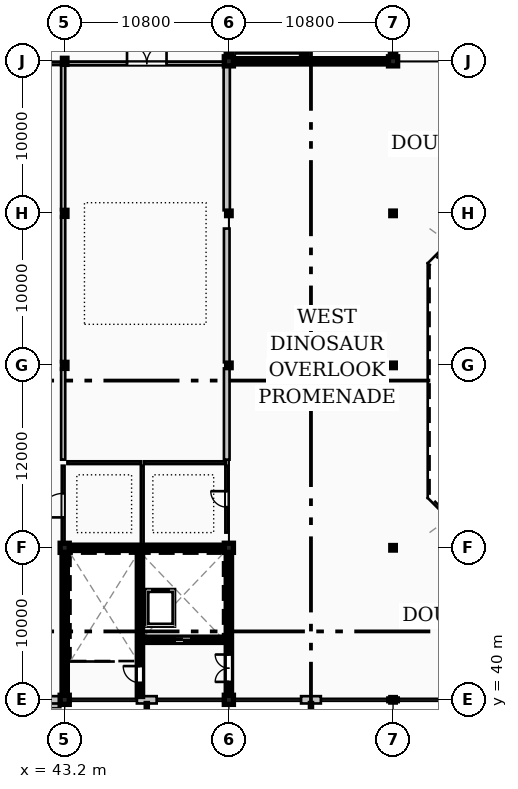
"""IFC4 building model, lengths in metres.
Left out: names, types, materials, properties, quantities, classifications, styles, units other than length and angle.
Written with IfcOpenShell. Run it as: python <this file> out.ifc"""

import sys

from ifc_helpers import new_model, si_unit, direction, frame, frame_2d, origin, origin_2d, place, context, subcontext, project, spatial, rectangle, hollow_rectangle, i_section, extrude, element, fill, save


model = new_model("IFC4")
c1 = context("Model", 3, precision=1e-05, world=origin(), true_north=direction((0.0, 1.0)))
c2 = subcontext(c1, "Body", "Model", "MODEL_VIEW")
j1 = project(units=[si_unit("LENGTHUNIT", "METRE"), si_unit("PLANEANGLEUNIT", "RADIAN")], contexts=[c1])
p1 = place(None, origin())
s1 = spatial("IfcSite", under=j1, at=p1, CompositionType="ELEMENT")
p2 = place(p1, origin())
s2 = spatial("IfcBuilding", under=s1, at=p2, CompositionType="ELEMENT")
p3 = place(p2, frame((0.0, 0.0, 14.4)))
s3 = spatial("IfcBuildingStorey", under=s2, at=p3, CompositionType="ELEMENT", Elevation=14.4)
for number, where, z_axis, x_axis in (
    (1, (43.2, 40.0, 0.0), (0.0, 0.0, 1.0), (1.0, 0.0, 0.0)),
    (2, (43.2, 50.0, 0.0), (0.0, 0.0, 1.0), (1.0, 0.0, 0.0)),
):
    element("IfcColumn", number, at=place(p3, frame(where, z_axis=z_axis, x_axis=x_axis)), inside=s3, PredefinedType="COLUMN", context=c2, shape_type="SweptSolid", body=[
        extrude(rectangle(XDim=0.6, YDim=0.6, at=origin_2d()), origin(), (0.0, 0.0, 1.0), 9.6),
    ])
for number, where, z_axis, x_axis in (
    (3, (43.2, 62.0, 0.0), (0.0, 0.0, 1.0), (1.0, 0.0, 0.0)),
    (4, (43.2, 72.0, 0.0), (0.0, 0.0, 1.0), (1.0, 0.0, 0.0)),
    (5, (43.2, 82.0, 0.0), (0.0, 0.0, 1.0), (1.0, 0.0, 0.0)),
):
    element("IfcColumn", number, at=place(p3, frame(where, z_axis=z_axis, x_axis=x_axis)), inside=s3, PredefinedType="COLUMN", context=c2, shape_type="SweptSolid", body=[
        extrude(i_section(OverallWidth=0.3, OverallDepth=0.4, WebThickness=0.013, FlangeThickness=0.024, FilletRadius=0.027, at=origin_2d()), origin(), (0.0, 0.0, 1.0), 9.6),
    ])
for number, where, z_axis, x_axis in (
    (6, (54.0, 40.0, 0.0), (0.0, 0.0, 1.0), (1.0, 0.0, 0.0)),
    (7, (54.0, 50.0, 0.0), (0.0, 0.0, 1.0), (1.0, 0.0, 0.0)),
):
    element("IfcColumn", number, at=place(p3, frame(where, z_axis=z_axis, x_axis=x_axis)), inside=s3, PredefinedType="COLUMN", context=c2, shape_type="SweptSolid", body=[
        extrude(rectangle(XDim=0.6, YDim=0.6, at=origin_2d()), origin(), (0.0, 0.0, 1.0), 9.6),
    ])
for number, where, z_axis, x_axis in (
    (8, (54.0, 62.0, 0.0), (0.0, 0.0, 1.0), (1.0, 0.0, 0.0)),
    (9, (54.0, 72.0, 0.0), (0.0, 0.0, 1.0), (1.0, 0.0, 0.0)),
):
    element("IfcColumn", number, at=place(p3, frame(where, z_axis=z_axis, x_axis=x_axis)), inside=s3, PredefinedType="COLUMN", context=c2, shape_type="SweptSolid", body=[
        extrude(hollow_rectangle(XDim=0.3, YDim=0.3, WallThickness=0.016, InnerFilletRadius=0.016, OuterFilletRadius=0.032, at=origin_2d()), origin(), (0.0, 0.0, 1.0), 9.6),
    ])
p4 = place(p3, frame((54.0, 82.0, 0.0), z_axis=(0.0, 0.0, 1.0), x_axis=(1.0, 0.0, 0.0)))
e10 = element("IfcColumn", 10, at=p4, inside=s3, PredefinedType="COLUMN", context=c2, shape_type="SweptSolid", body=[
    extrude(rectangle(XDim=0.6, YDim=0.6, at=origin_2d()), origin(), (0.0, 0.0, 1.0), 9.6),
])
for number, where, z_axis, x_axis in (
    (11, (64.8, 40.0, 0.0), (0.0, 0.0, 1.0), (1.0, 0.0, 0.0)),
    (12, (64.8, 50.0, 0.0), (0.0, 0.0, 1.0), (1.0, 0.0, 0.0)),
    (13, (64.8, 62.0, 0.0), (0.0, 0.0, 1.0), (1.0, 0.0, 0.0)),
    (14, (64.8, 72.0, 0.0), (0.0, 0.0, 1.0), (1.0, 0.0, 0.0)),
):
    element("IfcColumn", number, at=place(p3, frame(where, z_axis=z_axis, x_axis=x_axis)), inside=s3, PredefinedType="COLUMN", context=c2, shape_type="SweptSolid", body=[
        extrude(hollow_rectangle(XDim=0.3, YDim=0.3, WallThickness=0.016, InnerFilletRadius=0.016, OuterFilletRadius=0.032, at=origin_2d()), origin(), (0.0, 0.0, 1.0), 9.6),
    ])
p5 = place(p3, frame((64.8, 82.0, 0.0), z_axis=(0.0, 0.0, 1.0), x_axis=(1.0, 0.0, 0.0)))
e15 = element("IfcColumn", 15, at=p5, inside=s3, PredefinedType="COLUMN", context=c2, shape_type="SweptSolid", body=[
    extrude(rectangle(XDim=0.6, YDim=0.6, at=origin_2d()), origin(), (0.0, 0.0, 1.0), 9.6),
])
p6 = place(p3, frame((32.545, 40.0, 0.0), z_axis=(0.0, 0.0, 1.0), x_axis=(1.0, 0.0, 0.0)))
e16 = element("IfcWall", 16, at=p6, inside=s3, PredefinedType="STANDARD", context=c2, shape_type="SweptSolid", body=[
    extrude(rectangle(XDim=10.51, YDim=0.48, at=frame_2d((5.255, 0.0))), origin(), (0.0, 0.0, 1.0), 9.36),
])
p7 = place(p6, frame((3.555, 0.0, 1.1)))
e17 = element("IfcOpeningElement", 17, at=p7, cuts=e16, PredefinedType="OPENING", context=c2, shape_type="SweptSolid", body=[
    extrude(rectangle(XDim=3.4, YDim=5.8, at=frame_2d((1.7, 2.9))), frame((0.0, 0.25, 0.0), z_axis=(0.0, -1.0, 0.0), x_axis=(1.0, 0.0, 0.0)), (0.0, 0.0, 1.0), 0.5),
])
p8 = place(p3, frame((47.95, 40.0, 0.0), z_axis=(0.0, 0.0, 1.0), x_axis=(1.0, 0.0, 0.0)))
e18 = element("IfcWall", 18, at=p8, inside=s3, PredefinedType="STANDARD", context=c2, shape_type="SweptSolid", body=[
    extrude(rectangle(XDim=1.3, YDim=0.48, at=frame_2d((0.65, 0.0))), origin(), (0.0, 0.0, 1.0), 9.36),
])
for number, where, z_axis, x_axis in (
    (19, (43.345, 40.0, 0.0), (0.0, 0.0, 1.0), (1.0, 0.0, 0.0)),
    (20, (53.63, 40.0, 0.0), (0.0, 0.0, 1.0), (1.0, 0.0, 0.0)),
):
    element("IfcWall", number, at=place(p3, frame(where, z_axis=z_axis, x_axis=x_axis)), inside=s3, PredefinedType="STANDARD", context=c2, shape_type="SweptSolid", body=[
        extrude(rectangle(XDim=0.225, YDim=0.3, at=frame_2d((0.113, 0.0))), origin(), (0.0, 0.0, 1.0), 9.36),
    ])
p9 = place(p3, frame((58.75, 40.0, 0.0), z_axis=(0.0, 0.0, 1.0), x_axis=(1.0, 0.0, 0.0)))
e21 = element("IfcWall", 21, at=p9, inside=s3, PredefinedType="STANDARD", context=c2, shape_type="SweptSolid", body=[
    extrude(rectangle(XDim=1.3, YDim=0.48, at=frame_2d((0.65, 0.0))), origin(), (0.0, 0.0, 1.0), 8.96),
])
for number, where, z_axis, x_axis in (
    (22, (54.145, 40.0, 0.0), (0.0, 0.0, 1.0), (1.0, 0.0, 0.0)),
    (23, (64.43, 40.0, 0.0), (0.0, 0.0, 1.0), (1.0, 0.0, 0.0)),
):
    element("IfcWall", number, at=place(p3, frame(where, z_axis=z_axis, x_axis=x_axis)), inside=s3, PredefinedType="STANDARD", context=c2, shape_type="SweptSolid", body=[
        extrude(rectangle(XDim=0.225, YDim=0.3, at=frame_2d((0.113, 0.0))), origin(), (0.0, 0.0, 1.0), 9.36),
    ])
p10 = place(p3, frame((64.945, 40.0, 0.0), z_axis=(0.0, 0.0, 1.0), x_axis=(1.0, 0.0, 0.0)))
e24 = element("IfcWall", 24, at=p10, inside=s3, PredefinedType="STANDARD", context=c2, shape_type="SweptSolid", body=[
    extrude(rectangle(XDim=0.225, YDim=0.3, at=frame_2d((0.112, 0.0))), origin(), (0.0, 0.0, 1.0), 9.36),
])
p11 = place(p3, frame((54.3, 82.0, 0.0), z_axis=(0.0, 0.0, 1.0), x_axis=(1.0, 0.0, 0.0)))
e25 = element("IfcWall", 25, at=p11, inside=s3, PredefinedType="SHEAR", context=c2, shape_type="SweptSolid", body=[
    extrude(rectangle(XDim=10.2, YDim=0.35, at=frame_2d((5.1, 0.0))), origin(), (0.0, 0.0, 1.0), 9.36),
])
p12 = place(p3, frame((54.0, 82.3, 0.0), z_axis=(0.0, 0.0, 1.0), x_axis=(0.0, 1.0, 0.0)))
e26 = element("IfcWall", 26, at=p12, inside=s3, PredefinedType="SHEAR", context=c2, shape_type="SweptSolid", body=[
    extrude(rectangle(XDim=9.4, YDim=0.35, at=frame_2d((4.7, 0.0))), origin(), (0.0, 0.0, 1.0), 9.36),
])
p13 = place(p3, frame((64.8, 82.3, 0.0), z_axis=(0.0, 0.0, 1.0), x_axis=(0.0, 1.0, 0.0)))
e27 = element("IfcWall", 27, at=p13, inside=s3, PredefinedType="SHEAR", context=c2, shape_type="SweptSolid", body=[
    extrude(rectangle(XDim=9.4, YDim=0.35, at=frame_2d((4.7, 0.0))), origin(), (0.0, 0.0, 1.0), 9.36),
])
p14 = place(p13, frame((0.88, 0.0, 0.0)))
e28 = element("IfcOpeningElement", 28, at=p14, cuts=e27, PredefinedType="OPENING", context=c2, shape_type="SweptSolid", body=[
    extrude(rectangle(XDim=1.8, YDim=2.25, at=frame_2d((0.9, 1.125))), frame((0.0, 0.185, 0.0), z_axis=(0.0, -1.0, 0.0), x_axis=(1.0, 0.0, 0.0)), (0.0, 0.0, 1.0), 0.37),
])
p15 = place(p3, frame((58.95, 82.175, 0.0), z_axis=(0.0, 0.0, 1.0), x_axis=(0.0, 1.0, 0.0)))
e29 = element("IfcWall", 29, at=p15, inside=s3, PredefinedType="SHEAR", context=c2, shape_type="SweptSolid", body=[
    extrude(rectangle(XDim=9.65, YDim=0.35, at=frame_2d((4.825, 0.0))), origin(), (0.0, 0.0, 1.0), 9.36),
])
p16 = place(p15, frame((0.9, 0.0, 0.0)))
e30 = element("IfcOpeningElement", 30, at=p16, cuts=e29, PredefinedType="OPENING", context=c2, shape_type="SweptSolid", body=[
    extrude(rectangle(XDim=1.1, YDim=2.2, at=frame_2d((0.55, 1.1))), frame((0.0, 0.185, 0.0), z_axis=(0.0, -1.0, 0.0), x_axis=(1.0, 0.0, 0.0)), (0.0, 0.0, 1.0), 0.37),
])
p17 = place(p3, frame((43.5, 50.0, 0.0), z_axis=(0.0, 0.0, 1.0), x_axis=(1.0, 0.0, 0.0)))
e31 = element("IfcWall", 31, at=p17, inside=s3, PredefinedType="SHEAR", context=c2, shape_type="SweptSolid", body=[
    extrude(rectangle(XDim=10.2, YDim=0.35, at=frame_2d((5.1, 0.0))), origin(), (0.0, 0.0, 1.0), 9.36),
])
p18 = place(p3, frame((43.2, 40.3, 0.0), z_axis=(0.0, 0.0, 1.0), x_axis=(0.0, 1.0, 0.0)))
e32 = element("IfcWall", 32, at=p18, inside=s3, PredefinedType="SHEAR", context=c2, shape_type="SweptSolid", body=[
    extrude(rectangle(XDim=9.4, YDim=0.35, at=frame_2d((4.7, 0.0))), origin(), (0.0, 0.0, 1.0), 9.36),
])
p19 = place(p3, frame((54.0, 40.3, 0.0), z_axis=(0.0, 0.0, 1.0), x_axis=(0.0, 1.0, 0.0)))
e33 = element("IfcWall", 33, at=p19, inside=s3, PredefinedType="SHEAR", context=c2, shape_type="SweptSolid", body=[
    extrude(rectangle(XDim=9.4, YDim=0.35, at=frame_2d((4.7, 0.0))), origin(), (0.0, 0.0, 1.0), 9.36),
])
p20 = place(p19, frame((0.88, 0.0, 0.0)))
e34 = element("IfcOpeningElement", 34, at=p20, cuts=e33, PredefinedType="OPENING", context=c2, shape_type="SweptSolid", body=[
    extrude(rectangle(XDim=1.8, YDim=2.25, at=frame_2d((0.9, 1.125))), frame((0.0, 0.185, 0.0), z_axis=(0.0, -1.0, 0.0), x_axis=(1.0, 0.0, 0.0)), (0.0, 0.0, 1.0), 0.37),
])
p21 = place(p3, frame((48.15, 40.22, 0.0), z_axis=(0.0, 0.0, 1.0), x_axis=(0.0, 1.0, 0.0)))
e35 = element("IfcWall", 35, at=p21, inside=s3, PredefinedType="SHEAR", context=c2, shape_type="SweptSolid", body=[
    extrude(rectangle(XDim=9.605, YDim=0.35, at=frame_2d((4.802, 0.0))), origin(), (0.0, 0.0, 1.0), 9.36),
])
p22 = place(p21, frame((0.9, 0.0, 0.0)))
e36 = element("IfcOpeningElement", 36, at=p22, cuts=e35, PredefinedType="OPENING", context=c2, shape_type="SweptSolid", body=[
    extrude(rectangle(XDim=1.1, YDim=2.2, at=frame_2d((0.55, 1.1))), frame((0.0, 0.185, 0.0), z_axis=(0.0, -1.0, 0.0), x_axis=(1.0, 0.0, 0.0)), (0.0, 0.0, 1.0), 0.37),
])
p23 = place(p3, frame((48.33, 43.95, 0.0), z_axis=(0.0, 0.0, 1.0), x_axis=(1.0, 0.0, 0.0)))
e37 = element("IfcWall", 37, at=p23, inside=s3, PredefinedType="SHEAR", context=c2, shape_type="SweptSolid", body=[
    extrude(rectangle(XDim=5.49, YDim=0.35, at=frame_2d((2.745, 0.0))), origin(), (0.0, 0.0, 1.0), 9.36),
])
p24 = place(p23, frame((2.1, 0.0, 0.0)))
e38 = element("IfcOpeningElement", 38, at=p24, cuts=e37, PredefinedType="OPENING", context=c2, shape_type="SweptSolid", body=[
    extrude(rectangle(XDim=1.1, YDim=2.2, at=frame_2d((0.55, 1.1))), frame((0.0, 0.185, 0.0), z_axis=(0.0, -1.0, 0.0), x_axis=(1.0, 0.0, 0.0)), (0.0, 0.0, 1.0), 0.37),
])
p25 = place(p3, frame((32.6, 81.85, 0.0), z_axis=(0.0, 0.0, 1.0), x_axis=(1.0, 0.0, 0.0)))
e39 = element("IfcWall", 39, at=p25, inside=s3, PredefinedType="PARTITIONING", context=c2, shape_type="SweptSolid", body=[
    extrude(rectangle(XDim=10.42, YDim=0.19, at=frame_2d((5.21, 0.0))), origin(), (0.0, 0.0, 1.0), 8.96),
])
p26 = place(p25, frame((4.01, 0.0, 0.0)))
e40 = element("IfcOpeningElement", 40, at=p26, cuts=e39, PredefinedType="OPENING", context=c2, shape_type="SweptSolid", body=[
    extrude(rectangle(XDim=2.4, YDim=2.8, at=frame_2d((1.2, 1.4))), frame((0.0, 0.105, 0.0), z_axis=(0.0, -1.0, 0.0), x_axis=(1.0, 0.0, 0.0)), (0.0, 0.0, 1.0), 0.21),
])
p27 = place(p3, frame((43.38, 81.85, 0.0), z_axis=(0.0, 0.0, 1.0), x_axis=(1.0, 0.0, 0.0)))
e41 = element("IfcWall", 41, at=p27, inside=s3, PredefinedType="PARTITIONING", context=c2, shape_type="SweptSolid", body=[
    extrude(rectangle(XDim=10.44, YDim=0.23, at=frame_2d((5.22, 0.0))), origin(), (0.0, 0.0, 1.0), 8.96),
])
p28 = place(p27, frame((3.92, 0.0, 0.0)))
e42 = element("IfcOpeningElement", 42, at=p28, cuts=e41, PredefinedType="OPENING", context=c2, shape_type="SweptSolid", body=[
    extrude(rectangle(XDim=2.6, YDim=2.8, at=frame_2d((1.3, 1.4))), frame((0.0, 0.125, 0.0), z_axis=(0.0, -1.0, 0.0), x_axis=(1.0, 0.0, 0.0)), (0.0, 0.0, 1.0), 0.25),
])
p29 = place(p3, frame((43.1, 50.18, 0.0), z_axis=(0.0, 0.0, 1.0), x_axis=(0.0, 1.0, 0.0)))
e43 = element("IfcWall", 43, at=p29, inside=s3, PredefinedType="PLUMBINGWALL", context=c2, shape_type="SweptSolid", body=[
    extrude(rectangle(XDim=5.22, YDim=0.18, at=frame_2d((2.61, 0.0))), origin(), (0.0, 0.0, 1.0), 9.32),
])
p30 = place(p29, frame((1.82, 0.0, 0.0)))
e44 = element("IfcOpeningElement", 44, at=p30, cuts=e43, PredefinedType="OPENING", context=c2, shape_type="SweptSolid", body=[
    extrude(rectangle(XDim=1.58, YDim=2.48, at=frame_2d((0.79, 1.24))), frame((0.0, 0.1, 0.0), z_axis=(0.0, -1.0, 0.0), x_axis=(1.0, 0.0, 0.0)), (0.0, 0.0, 1.0), 0.2),
])
p31 = place(p3, frame((53.86, 51.0, 0.0), z_axis=(0.0, 0.0, 1.0), x_axis=(0.0, 1.0, 0.0)))
e45 = element("IfcWall", 45, at=p31, inside=s3, PredefinedType="PLUMBINGWALL", context=c2, shape_type="SweptSolid", body=[
    extrude(rectangle(XDim=4.4, YDim=0.18, at=frame_2d((2.2, 0.0))), origin(), (0.0, 0.0, 1.0), 9.32),
])
p32 = place(p31, frame((1.675, 0.0, 0.0)))
e46 = element("IfcOpeningElement", 46, at=p32, cuts=e45, PredefinedType="OPENING", context=c2, shape_type="SweptSolid", body=[
    extrude(rectangle(XDim=1.05, YDim=2.15, at=frame_2d((0.525, 1.075))), frame((0.0, 0.1, 0.0), z_axis=(0.0, -1.0, 0.0), x_axis=(1.0, 0.0, 0.0)), (0.0, 0.0, 1.0), 0.2),
])
p33 = place(p3, frame((43.38, 55.6, 0.0), z_axis=(0.0, 0.0, 1.0), x_axis=(1.0, 0.0, 0.0)))
e47 = element("IfcWall", 47, at=p33, inside=s3, PredefinedType="PLUMBINGWALL", context=c2, shape_type="SweptSolid", body=[
    extrude(rectangle(XDim=4.82, YDim=0.18, at=frame_2d((2.41, 0.0))), origin(), (0.0, 0.0, 1.0), 9.32),
])
p34 = place(p3, frame((48.4, 55.6, 0.0), z_axis=(0.0, 0.0, 1.0), x_axis=(1.0, 0.0, 0.0)))
e48 = element("IfcWall", 48, at=p34, inside=s3, PredefinedType="PLUMBINGWALL", context=c2, shape_type="SweptSolid", body=[
    extrude(rectangle(XDim=5.42, YDim=0.18, at=frame_2d((2.71, 0.0))), origin(), (0.0, 0.0, 1.0), 9.32),
])
p35 = place(p3, frame((43.1, 55.8, 0.0), z_axis=(0.0, 0.0, 1.0), x_axis=(0.0, 1.0, 0.0)))
e49 = element("IfcWall", 49, at=p35, inside=s3, PredefinedType="PARTITIONING", context=c2, shape_type="SweptSolid", body=[
    extrude(rectangle(XDim=6.0, YDim=0.27, at=frame_2d((3.0, 0.0))), origin(), (0.0, 0.0, 1.0), 9.32),
])
p36 = place(p3, frame((43.1, 62.2, 0.0), z_axis=(0.0, 0.0, 1.0), x_axis=(0.0, 1.0, 0.0)))
e50 = element("IfcWall", 50, at=p36, inside=s3, PredefinedType="PARTITIONING", context=c2, shape_type="SweptSolid", body=[
    extrude(rectangle(XDim=9.6, YDim=0.27, at=frame_2d((4.8, 0.0))), origin(), (0.0, 0.0, 1.0), 9.32),
])
p37 = place(p3, frame((43.1, 72.2, 0.0), z_axis=(0.0, 0.0, 1.0), x_axis=(0.0, 1.0, 0.0)))
e51 = element("IfcWall", 51, at=p37, inside=s3, PredefinedType="PARTITIONING", context=c2, shape_type="SweptSolid", body=[
    extrude(rectangle(XDim=9.62, YDim=0.27, at=frame_2d((4.81, 0.0))), origin(), (0.0, 0.0, 1.0), 9.32),
])
p38 = place(p3, frame((48.3, 50.18, 0.0), z_axis=(0.0, 0.0, 1.0), x_axis=(0.0, 1.0, 0.0)))
e52 = element("IfcWall", 52, at=p38, inside=s3, PredefinedType="PLUMBINGWALL", context=c2, shape_type="SweptSolid", body=[
    extrude(rectangle(XDim=5.22, YDim=0.18, at=frame_2d((2.61, 0.0))), origin(), (0.0, 0.0, 1.0), 9.32),
])
p39 = place(p3, frame((53.86, 55.8, 0.0), z_axis=(0.0, 0.0, 1.0), x_axis=(0.0, 1.0, 0.0)))
e53 = element("IfcWall", 53, at=p39, inside=s3, PredefinedType="PARTITIONING", context=c2, shape_type="SweptSolid", body=[
    extrude(rectangle(XDim=6.0, YDim=0.37, at=frame_2d((3.0, 0.0))), origin(), (0.0, 0.0, 1.0), 9.32),
])
p40 = place(p3, frame((53.86, 62.2, 0.0), z_axis=(0.0, 0.0, 1.0), x_axis=(0.0, 1.0, 0.0)))
e54 = element("IfcWall", 54, at=p40, inside=s3, PredefinedType="PARTITIONING", context=c2, shape_type="SweptSolid", body=[
    extrude(rectangle(XDim=8.8, YDim=0.37, at=frame_2d((4.4, 0.0))), origin(), (0.0, 0.0, 1.0), 9.32),
])
p41 = place(p3, frame((53.86, 72.2, 0.0), z_axis=(0.0, 0.0, 1.0), x_axis=(0.0, 1.0, 0.0)))
e55 = element("IfcWall", 55, at=p41, inside=s3, PredefinedType="PARTITIONING", context=c2, shape_type="SweptSolid", body=[
    extrude(rectangle(XDim=9.62, YDim=0.41, at=frame_2d((4.81, 0.0))), origin(), (0.0, 0.0, 1.0), 9.32),
])
p42 = place(p22, origin())
e56 = element("IfcDoor", 56, at=p42, inside=s3, OperationType="SINGLE_SWING_RIGHT", PredefinedType="DOOR", context=c2, shape_type="SweptSolid", body=[
    extrude(rectangle(XDim=1.1, YDim=2.2, at=frame_2d((0.55, 1.1))), frame((0.0, 0.025, 0.0), z_axis=(0.0, -1.0, 0.0), x_axis=(1.0, 0.0, 0.0)), (0.0, 0.0, 1.0), 0.05),
])
fill(e36, e56)
p43 = place(p20, origin())
e57 = element("IfcDoor", 57, at=p43, inside=s3, OperationType="DOUBLE_DOOR_SINGLE_SWING", PredefinedType="DOOR", context=c2, shape_type="SweptSolid", body=[
    extrude(rectangle(XDim=1.8, YDim=2.25, at=frame_2d((0.9, 1.125))), frame((0.0, 0.025, 0.0), z_axis=(0.0, -1.0, 0.0), x_axis=(1.0, 0.0, 0.0)), (0.0, 0.0, 1.0), 0.05),
])
fill(e34, e57)
p44 = place(p24, origin())
e58 = element("IfcDoor", 58, at=p44, inside=s3, OperationType="DOUBLE_DOOR_SLIDING", PredefinedType="DOOR", context=c2, shape_type="SweptSolid", body=[
    extrude(rectangle(XDim=1.1, YDim=2.2, at=frame_2d((0.55, 1.1))), frame((0.0, 0.025, 0.0), z_axis=(0.0, -1.0, 0.0), x_axis=(1.0, 0.0, 0.0)), (0.0, 0.0, 1.0), 0.05),
])
fill(e38, e58)
p45 = place(p28, origin())
e59 = element("IfcDoor", 59, at=p45, inside=s3, OperationType="DOUBLE_DOOR_SINGLE_SWING", PredefinedType="DOOR", context=c2, shape_type="SweptSolid", body=[
    extrude(rectangle(XDim=2.6, YDim=2.8, at=frame_2d((1.3, 1.4))), frame((0.0, 0.025, 0.0), z_axis=(0.0, -1.0, 0.0), x_axis=(1.0, 0.0, 0.0)), (0.0, 0.0, 1.0), 0.05),
])
fill(e42, e59)
p46 = place(p30, origin())
e60 = element("IfcDoor", 60, at=p46, inside=s3, OperationType="SINGLE_SWING_LEFT", PredefinedType="DOOR", context=c2, shape_type="SweptSolid", body=[
    extrude(rectangle(XDim=1.58, YDim=2.48, at=frame_2d((0.79, 1.24))), frame((0.0, 0.025, 0.0), z_axis=(0.0, -1.0, 0.0), x_axis=(1.0, 0.0, 0.0)), (0.0, 0.0, 1.0), 0.05),
])
fill(e44, e60)
p47 = place(p32, origin())
e61 = element("IfcDoor", 61, at=p47, inside=s3, OperationType="SINGLE_SWING_RIGHT", PredefinedType="DOOR", context=c2, shape_type="SweptSolid", body=[
    extrude(rectangle(XDim=1.05, YDim=2.15, at=frame_2d((0.525, 1.075))), frame((0.0, 0.025, 0.0), z_axis=(0.0, -1.0, 0.0), x_axis=(1.0, 0.0, 0.0)), (0.0, 0.0, 1.0), 0.05),
])
fill(e46, e61)
save(model, sys.argv[1])
